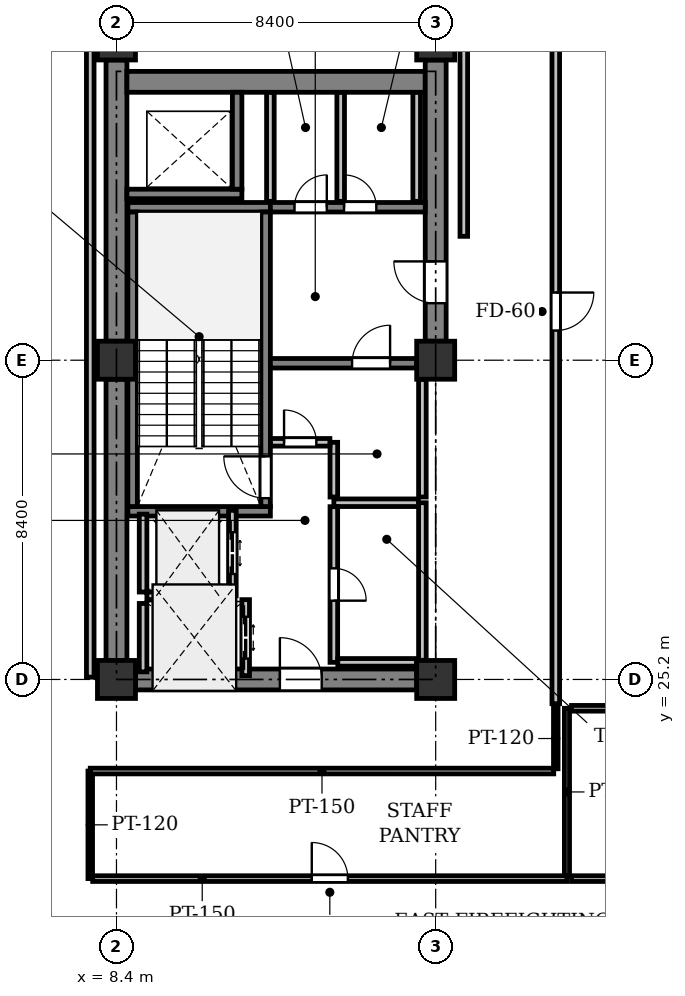
"""IFC4 building model, lengths in metres.
Left out: names, types, materials, properties, quantities, classifications, styles, units other than length and angle.
Written with IfcOpenShell. Run it as: python <this file> out.ifc"""

import sys

from ifc_helpers import new_model, si_unit, direction, frame, frame_2d, origin, origin_2d, place, context, subcontext, project, spatial, rectangle, extrude, element, fill, save


model = new_model("IFC4")
c1 = context("Model", 3, precision=1e-05, world=origin(), true_north=direction((0.0, 1.0)))
c2 = subcontext(c1, "Body", "Model", "MODEL_VIEW")
j1 = project(units=[si_unit("LENGTHUNIT", "METRE"), si_unit("PLANEANGLEUNIT", "RADIAN")], contexts=[c1])
p1 = place(None, origin())
s1 = spatial("IfcSite", under=j1, at=p1, CompositionType="ELEMENT")
p2 = place(p1, origin())
s2 = spatial("IfcBuilding", under=s1, at=p2, CompositionType="ELEMENT")
p3 = place(p2, frame((0.0, 0.0, 167.3)))
s3 = spatial("IfcBuildingStorey", under=s2, at=p3, CompositionType="ELEMENT", Elevation=167.3)
for number, where, z_axis, x_axis in (
    (1, (8.4, 25.2, 0.0), (0.0, 0.0, 1.0), (1.0, 0.0, 0.0)),
    (2, (8.4, 33.6, 0.0), (0.0, 0.0, 1.0), (1.0, 0.0, 0.0)),
    (3, (8.4, 42.0, 0.0), (0.0, 0.0, 1.0), (1.0, 0.0, 0.0)),
    (4, (16.8, 25.2, 0.0), (0.0, 0.0, 1.0), (1.0, 0.0, 0.0)),
    (5, (16.8, 33.6, 0.0), (0.0, 0.0, 1.0), (1.0, 0.0, 0.0)),
    (6, (16.8, 42.0, 0.0), (0.0, 0.0, 1.0), (1.0, 0.0, 0.0)),
):
    element("IfcColumn", number, at=place(p3, frame(where, z_axis=z_axis, x_axis=x_axis)), inside=s3, PredefinedType="COLUMN", context=c2, shape_type="SweptSolid", body=[
        extrude(rectangle(XDim=1.0, YDim=1.0, at=origin_2d()), origin(), (0.0, 0.0, 1.0), 4.1),
    ])
p4 = place(p3, frame((8.4, 25.7, 0.0), z_axis=(0.0, 0.0, 1.0), x_axis=(0.0, 1.0, 0.0)))
e7 = element("IfcWall", 7, at=p4, inside=s3, PredefinedType="SHEAR", context=c2, shape_type="SweptSolid", body=[
    extrude(rectangle(XDim=7.4, YDim=0.55, at=frame_2d((3.7, 0.0))), origin(), (0.0, 0.0, 1.0), 3.825),
])
p5 = place(p3, frame((8.4, 34.1, 0.0), z_axis=(0.0, 0.0, 1.0), x_axis=(0.0, 1.0, 0.0)))
e8 = element("IfcWall", 8, at=p5, inside=s3, PredefinedType="SHEAR", context=c2, shape_type="SweptSolid", body=[
    extrude(rectangle(XDim=7.4, YDim=0.55, at=frame_2d((3.7, 0.0))), origin(), (0.0, 0.0, 1.0), 3.825),
])
p6 = place(p3, frame((8.675, 40.925, 0.0), z_axis=(0.0, 0.0, 1.0), x_axis=(1.0, 0.0, 0.0)))
e9 = element("IfcWall", 9, at=p6, inside=s3, PredefinedType="SHEAR", context=c2, shape_type="SweptSolid", body=[
    extrude(rectangle(XDim=7.85, YDim=0.55, at=frame_2d((3.925, 0.0))), origin(), (0.0, 0.0, 1.0), 3.825),
])
p7 = place(p3, frame((16.8, 34.1, 0.0), z_axis=(0.0, 0.0, 1.0), x_axis=(0.0, 1.0, 0.0)))
e10 = element("IfcWall", 10, at=p7, inside=s3, PredefinedType="SHEAR", context=c2, shape_type="SweptSolid", body=[
    extrude(rectangle(XDim=7.4, YDim=0.55, at=frame_2d((3.7, 0.0))), origin(), (0.0, 0.0, 1.0), 3.825),
])
p8 = place(p7, frame((1.0, 0.0, 0.0)))
e11 = element("IfcOpeningElement", 11, at=p8, cuts=e10, PredefinedType="OPENING", context=c2, shape_type="SweptSolid", body=[
    extrude(rectangle(XDim=1.1, YDim=2.15, at=frame_2d((0.55, 1.075))), frame((0.0, 0.285, 0.0), z_axis=(0.0, -1.0, 0.0), x_axis=(1.0, 0.0, 0.0)), (0.0, 0.0, 1.0), 0.57),
])
p9 = place(p3, frame((8.9, 25.2, 0.0), z_axis=(0.0, 0.0, 1.0), x_axis=(1.0, 0.0, 0.0)))
e12 = element("IfcWall", 12, at=p9, inside=s3, PredefinedType="SHEAR", context=c2, shape_type="SweptSolid", body=[
    extrude(rectangle(XDim=7.4, YDim=0.55, at=frame_2d((3.7, 0.0))), origin(), (0.0, 0.0, 1.0), 3.825),
])
p10 = place(p9, frame((3.8, 0.0, 0.0)))
e13 = element("IfcOpeningElement", 13, at=p10, cuts=e12, PredefinedType="OPENING", context=c2, shape_type="SweptSolid", body=[
    extrude(rectangle(XDim=1.1, YDim=2.15, at=frame_2d((0.55, 1.075))), frame((0.0, 0.285, 0.0), z_axis=(0.0, -1.0, 0.0), x_axis=(1.0, 0.0, 0.0)), (0.0, 0.0, 1.0), 0.57),
])
for number, where, z_axis, x_axis in (
    (14, (12.45, 29.625, 0.0), (0.0, 0.0, 1.0), (-1.0, 0.0, 0.0)),
    (15, (12.45, 37.625, 0.0), (0.0, 0.0, 1.0), (-1.0, 0.0, 0.0)),
):
    element("IfcWall", number, at=place(p3, frame(where, z_axis=z_axis, x_axis=x_axis)), inside=s3, PredefinedType="SHEAR", context=c2, shape_type="SweptSolid", body=[
        extrude(rectangle(XDim=3.75, YDim=0.25, at=frame_2d((1.875, 0.0))), origin(), (0.0, 0.0, 1.0), 3.825),
    ])
p11 = place(p3, frame((12.325, 29.75, 0.0), z_axis=(0.0, 0.0, 1.0), x_axis=(0.0, 1.0, 0.0)))
e16 = element("IfcWall", 16, at=p11, inside=s3, PredefinedType="SHEAR", context=c2, shape_type="SweptSolid", body=[
    extrude(rectangle(XDim=7.75, YDim=0.25, at=frame_2d((3.875, 0.0))), origin(), (0.0, 0.0, 1.0), 3.825),
])
p12 = place(p11, frame((0.22, 0.0, 0.0)))
e17 = element("IfcOpeningElement", 17, at=p12, cuts=e16, PredefinedType="OPENING", context=c2, shape_type="SweptSolid", body=[
    extrude(rectangle(XDim=1.1, YDim=2.15, at=frame_2d((0.55, 1.075))), frame((0.0, 0.135, 0.0), z_axis=(0.0, -1.0, 0.0), x_axis=(1.0, 0.0, 0.0)), (0.0, 0.0, 1.0), 0.27),
])
p13 = place(p3, frame((8.825, 29.75, 0.0), z_axis=(0.0, 0.0, 1.0), x_axis=(0.0, 1.0, 0.0)))
e18 = element("IfcWall", 18, at=p13, inside=s3, PredefinedType="SHEAR", context=c2, shape_type="SweptSolid", body=[
    extrude(rectangle(XDim=7.75, YDim=0.25, at=frame_2d((3.875, 0.0))), origin(), (0.0, 0.0, 1.0), 3.825),
])
p14 = place(p3, frame((8.675, 37.975, 0.0), z_axis=(0.0, 0.0, 1.0), x_axis=(1.0, 0.0, 0.0)))
e19 = element("IfcWall", 19, at=p14, inside=s3, PredefinedType="SHEAR", context=c2, shape_type="SweptSolid", body=[
    extrude(rectangle(XDim=3.025, YDim=0.25, at=frame_2d((1.512, 0.0))), origin(), (0.0, 0.0, 1.0), 3.825),
])
p15 = place(p3, frame((11.575, 38.1, 0.0), z_axis=(0.0, 0.0, 1.0), x_axis=(0.0, 1.0, 0.0)))
e20 = element("IfcWall", 20, at=p15, inside=s3, PredefinedType="SHEAR", context=c2, shape_type="SweptSolid", body=[
    extrude(rectangle(XDim=2.55, YDim=0.25, at=frame_2d((1.275, 0.0))), origin(), (0.0, 0.0, 1.0), 3.825),
])
p16 = place(p3, frame((12.45, 33.52, 0.0), z_axis=(0.0, 0.0, 1.0), x_axis=(1.0, 0.0, 0.0)))
e21 = element("IfcWall", 21, at=p16, inside=s3, PredefinedType="SHEAR", context=c2, shape_type="SweptSolid", body=[
    extrude(rectangle(XDim=3.85, YDim=0.25, at=frame_2d((1.925, 0.0))), origin(), (0.0, 0.0, 1.0), 3.825),
])
p17 = place(p16, frame((2.15, 0.0, 0.0)))
e22 = element("IfcOpeningElement", 22, at=p17, cuts=e21, PredefinedType="OPENING", context=c2, shape_type="SweptSolid", body=[
    extrude(rectangle(XDim=1.0, YDim=2.15, at=frame_2d((0.5, 1.075))), frame((0.0, 0.135, 0.0), z_axis=(0.0, -1.0, 0.0), x_axis=(1.0, 0.0, 0.0)), (0.0, 0.0, 1.0), 0.27),
])
p18 = place(p3, frame((12.45, 37.625, 0.0), z_axis=(0.0, 0.0, 1.0), x_axis=(1.0, 0.0, 0.0)))
e23 = element("IfcWall", 23, at=p18, inside=s3, PredefinedType="SHEAR", context=c2, shape_type="SweptSolid", body=[
    extrude(rectangle(XDim=4.075, YDim=0.25, at=frame_2d((2.038, 0.0))), origin(), (0.0, 0.0, 1.0), 3.825),
])
p19 = place(p18, frame((0.635, 0.0, 0.0)))
e24 = element("IfcOpeningElement", 24, at=p19, cuts=e23, PredefinedType="OPENING", context=c2, shape_type="SweptSolid", body=[
    extrude(rectangle(XDim=0.85, YDim=2.15, at=frame_2d((0.425, 1.075))), frame((0.0, 0.135, 0.0), z_axis=(0.0, -1.0, 0.0), x_axis=(1.0, 0.0, 0.0)), (0.0, 0.0, 1.0), 0.27),
])
p20 = place(p18, frame((1.938, 0.0, 0.0)))
e25 = element("IfcOpeningElement", 25, at=p20, cuts=e23, PredefinedType="OPENING", context=c2, shape_type="SweptSolid", body=[
    extrude(rectangle(XDim=0.85, YDim=2.15, at=frame_2d((0.425, 1.075))), frame((0.0, 0.135, 0.0), z_axis=(0.0, -1.0, 0.0), x_axis=(1.0, 0.0, 0.0)), (0.0, 0.0, 1.0), 0.27),
])
p21 = place(p3, frame((11.45, 27.4, 0.0), z_axis=(0.0, 0.0, 1.0), x_axis=(0.0, 1.0, 0.0)))
e26 = element("IfcWall", 26, at=p21, inside=s3, PredefinedType="PARTITIONING", context=c2, shape_type="SweptSolid", body=[
    extrude(rectangle(XDim=2.25, YDim=0.2, at=frame_2d((1.125, 0.0))), origin(), (0.0, 0.0, 1.0), 3.825),
])
p22 = place(p21, frame((0.575, 0.0, 0.0)))
e27 = element("IfcOpeningElement", 27, at=p22, cuts=e26, PredefinedType="OPENING", context=c2, shape_type="SweptSolid", body=[
    extrude(rectangle(XDim=1.1, YDim=2.2, at=frame_2d((0.55, 1.1))), frame((0.0, 0.11, 0.0), z_axis=(0.0, -1.0, 0.0), x_axis=(1.0, 0.0, 0.0)), (0.0, 0.0, 1.0), 0.22),
])
p23 = place(p3, frame((9.1, 27.5, 0.0), z_axis=(0.0, 0.0, 1.0), x_axis=(0.0, 1.0, 0.0)))
e28 = element("IfcWall", 28, at=p23, inside=s3, PredefinedType="PARTITIONING", context=c2, shape_type="SweptSolid", body=[
    extrude(rectangle(XDim=2.05, YDim=0.2, at=frame_2d((1.025, 0.0))), origin(), (0.0, 0.0, 1.0), 3.825),
])
p24 = place(p3, frame((9.2, 27.4, 0.0), z_axis=(0.0, 0.0, 1.0), x_axis=(1.0, 0.0, 0.0)))
e29 = element("IfcWall", 29, at=p24, inside=s3, PredefinedType="PARTITIONING", context=c2, shape_type="SweptSolid", body=[
    extrude(rectangle(XDim=2.15, YDim=0.2, at=frame_2d((1.075, 0.0))), origin(), (0.0, 0.0, 1.0), 3.825),
])
p25 = place(p3, frame((11.8, 25.3, 0.0), z_axis=(0.0, 0.0, 1.0), x_axis=(0.0, 1.0, 0.0)))
e30 = element("IfcWall", 30, at=p25, inside=s3, PredefinedType="PARTITIONING", context=c2, shape_type="SweptSolid", body=[
    extrude(rectangle(XDim=2.0, YDim=0.2, at=frame_2d((1.0, 0.0))), origin(), (0.0, 0.0, 1.0), 2.425),
])
p26 = place(p25, frame((0.45, 0.0, 0.0)))
e31 = element("IfcOpeningElement", 31, at=p26, cuts=e30, PredefinedType="OPENING", context=c2, shape_type="SweptSolid", body=[
    extrude(rectangle(XDim=1.1, YDim=2.2, at=frame_2d((0.55, 1.1))), frame((0.0, 0.11, 0.0), z_axis=(0.0, -1.0, 0.0), x_axis=(1.0, 0.0, 0.0)), (0.0, 0.0, 1.0), 0.22),
])
p27 = place(p3, frame((9.1, 25.4, 0.0), z_axis=(0.0, 0.0, 1.0), x_axis=(0.0, 1.0, 0.0)))
e32 = element("IfcWall", 32, at=p27, inside=s3, PredefinedType="PARTITIONING", context=c2, shape_type="SweptSolid", body=[
    extrude(rectangle(XDim=1.8, YDim=0.2, at=frame_2d((0.9, 0.0))), origin(), (0.0, 0.0, 1.0), 2.425),
])
p28 = place(p3, frame((16.45, 25.705, 0.0), z_axis=(0.0, 0.0, 1.0), x_axis=(0.0, 1.0, 0.0)))
e33 = element("IfcWall", 33, at=p28, inside=s3, PredefinedType="PARTITIONING", context=c2, shape_type="SweptSolid", body=[
    extrude(rectangle(XDim=4.145, YDim=0.2, at=frame_2d((2.073, 0.0))), origin(), (0.0, 0.0, 1.0), 3.825),
])
p29 = place(p3, frame((16.346, 29.85, 0.0), z_axis=(0.0, 0.0, 1.0), x_axis=(-1.0, 0.0, 0.0)))
e34 = element("IfcWall", 34, at=p29, inside=s3, PredefinedType="PARTITIONING", context=c2, shape_type="SweptSolid", body=[
    extrude(rectangle(XDim=2.226, YDim=0.2, at=frame_2d((1.113, 0.0))), origin(), (0.0, 0.0, 1.0), 3.825),
])
p30 = place(p3, frame((14.12, 29.746, 0.0), z_axis=(0.0, 0.0, 1.0), x_axis=(0.0, -1.0, 0.0)))
e35 = element("IfcWall", 35, at=p30, inside=s3, PredefinedType="PARTITIONING", context=c2, shape_type="SweptSolid", body=[
    extrude(rectangle(XDim=4.096, YDim=0.2, at=frame_2d((2.048, 0.0))), origin(), (0.0, 0.0, 1.0), 3.825),
])
p31 = place(p30, frame((1.623, 0.0, 0.0)))
e36 = element("IfcOpeningElement", 36, at=p31, cuts=e35, PredefinedType="OPENING", context=c2, shape_type="SweptSolid", body=[
    extrude(rectangle(XDim=0.85, YDim=2.15, at=frame_2d((0.425, 1.075))), frame((0.0, 0.11, 0.0), z_axis=(0.0, -1.0, 0.0), x_axis=(1.0, 0.0, 0.0)), (0.0, 0.0, 1.0), 0.22),
])
p32 = place(p3, frame((14.224, 25.65, 0.0), z_axis=(0.0, 0.0, 1.0), x_axis=(1.0, 0.0, 0.0)))
e37 = element("IfcWall", 37, at=p32, inside=s3, PredefinedType="PARTITIONING", context=c2, shape_type="SweptSolid", body=[
    extrude(rectangle(XDim=2.071, YDim=0.2, at=frame_2d((1.035, 0.0))), origin(), (0.0, 0.0, 1.0), 3.825),
])
p33 = place(p3, frame((14.12, 31.44, 0.0), z_axis=(0.0, 0.0, 1.0), x_axis=(0.0, -1.0, 0.0)))
e38 = element("IfcWall", 38, at=p33, inside=s3, PredefinedType="PARTITIONING", context=c2, shape_type="SweptSolid", body=[
    extrude(rectangle(XDim=1.44, YDim=0.2, at=frame_2d((0.72, 0.0))), origin(), (0.0, 0.0, 1.0), 3.825),
])
p34 = place(p3, frame((16.45, 30.0, 0.0), z_axis=(0.0, 0.0, 1.0), x_axis=(0.0, 1.0, 0.0)))
e39 = element("IfcWall", 39, at=p34, inside=s3, PredefinedType="PARTITIONING", context=c2, shape_type="SweptSolid", body=[
    extrude(rectangle(XDim=3.095, YDim=0.2, at=frame_2d((1.547, 0.0))), origin(), (0.0, 0.0, 1.0), 3.825),
])
p35 = place(p3, frame((12.454, 31.44, 0.0), z_axis=(0.0, 0.0, 1.0), x_axis=(1.0, 0.0, 0.0)))
e40 = element("IfcWall", 40, at=p35, inside=s3, PredefinedType="PARTITIONING", context=c2, shape_type="SweptSolid", body=[
    extrude(rectangle(XDim=1.562, YDim=0.2, at=frame_2d((0.781, 0.0))), origin(), (0.0, 0.0, 1.0), 3.825),
])
p36 = place(p35, frame((0.356, 0.0, 0.0)))
e41 = element("IfcOpeningElement", 41, at=p36, cuts=e40, PredefinedType="OPENING", context=c2, shape_type="SweptSolid", body=[
    extrude(rectangle(XDim=0.85, YDim=2.15, at=frame_2d((0.425, 1.075))), frame((0.0, 0.11, 0.0), z_axis=(0.0, -1.0, 0.0), x_axis=(1.0, 0.0, 0.0)), (0.0, 0.0, 1.0), 0.22),
])
for number, where, z_axis, x_axis in (
    (42, (14.3, 37.78, 0.0), (0.0, 0.0, 1.0), (0.0, 1.0, 0.0)),
    (43, (12.45, 40.646, 0.0), (0.0, 0.0, 1.0), (0.0, -1.0, 0.0)),
    (44, (16.3, 37.78, 0.0), (0.0, 0.0, 1.0), (0.0, 1.0, 0.0)),
):
    element("IfcWall", number, at=place(p3, frame(where, z_axis=z_axis, x_axis=x_axis)), inside=s3, PredefinedType="PARTITIONING", context=c2, shape_type="SweptSolid", body=[
        extrude(rectangle(XDim=2.866, YDim=0.2, at=frame_2d((1.433, 0.0))), origin(), (0.0, 0.0, 1.0), 2.875),
    ])
p37 = place(p3, frame((7.71, 22.79, 0.0), z_axis=(0.0, 0.0, 1.0), x_axis=(0.0, -1.0, 0.0)))
e45 = element("IfcWall", 45, at=p37, inside=s3, PredefinedType="PARTITIONING", context=c2, shape_type="SweptSolid", body=[
    extrude(rectangle(XDim=2.83, YDim=0.12, at=frame_2d((1.415, 0.0))), origin(), (0.0, 0.0, 1.0), 3.825),
])
p38 = place(p3, frame((7.774, 19.96, 0.0), z_axis=(0.0, 0.0, 1.0), x_axis=(1.0, 0.0, 0.0)))
e46 = element("IfcWall", 46, at=p38, inside=s3, PredefinedType="PARTITIONING", context=c2, shape_type="SweptSolid", body=[
    extrude(rectangle(XDim=12.48, YDim=0.15, at=frame_2d((6.24, 0.0))), origin(), (0.0, 0.0, 1.0), 3.371),
])
p39 = place(p38, frame((5.765, 0.0, 0.0)))
e47 = element("IfcOpeningElement", 47, at=p39, cuts=e46, PredefinedType="OPENING", context=c2, shape_type="SweptSolid", body=[
    extrude(rectangle(XDim=0.95, YDim=2.15, at=frame_2d((0.475, 1.075))), frame((0.0, 0.085, 0.0), z_axis=(0.0, -1.0, 0.0), x_axis=(1.0, 0.0, 0.0)), (0.0, 0.0, 1.0), 0.17),
])
p40 = place(p3, frame((20.254, 20.039, 0.0), z_axis=(0.0, 0.0, 1.0), x_axis=(0.0, 1.0, 0.0)))
e48 = element("IfcWall", 48, at=p40, inside=s3, PredefinedType="PARTITIONING", context=c2, shape_type="SweptSolid", body=[
    extrude(rectangle(XDim=4.403, YDim=0.135, at=frame_2d((2.201, 0.0))), origin(), (0.0, 0.0, 1.0), 3.825),
])
p41 = place(p3, frame((19.96, 24.442, 0.0), z_axis=(0.0, 0.0, 1.0), x_axis=(0.0, -1.0, 0.0)))
e49 = element("IfcWall", 49, at=p41, inside=s3, PredefinedType="PARTITIONING", context=c2, shape_type="SweptSolid", body=[
    extrude(rectangle(XDim=1.592, YDim=0.12, at=frame_2d((0.796, 0.0))), origin(), (0.0, 0.0, 1.0), 3.825),
])
p42 = place(p3, frame((19.906, 22.79, 0.0), z_axis=(0.0, 0.0, 1.0), x_axis=(-0.9999999998, -2.0018016e-05, 0.0)))
e50 = element("IfcWall", 50, at=p42, inside=s3, PredefinedType="PARTITIONING", context=c2, shape_type="SweptSolid", body=[
    extrude(rectangle(XDim=12.196, YDim=0.15, at=frame_2d((6.098, 0.0))), origin(), (0.0, 0.0, 1.0), 3.371),
])
p43 = place(p3, frame((41.831, 24.442, 0.0), z_axis=(0.0, 0.0, 1.0), x_axis=(-1.0, 0.0, 0.0)))
e51 = element("IfcWall", 51, at=p43, inside=s3, PredefinedType="PARTITIONING", context=c2, shape_type="SweptSolid", body=[
    extrude(rectangle(XDim=21.457, YDim=0.15, at=frame_2d((10.728, 0.0))), origin(), (0.0, 0.0, 1.0), 3.371),
])
p44 = place(p3, frame((20.375, 19.96, 0.0), z_axis=(0.0, 0.0, 1.0), x_axis=(1.0, 0.0, 0.0)))
e52 = element("IfcWall", 52, at=p44, inside=s3, PredefinedType="PARTITIONING", context=c2, shape_type="SweptSolid", body=[
    extrude(rectangle(XDim=16.275, YDim=0.15, at=frame_2d((8.138, 0.0))), origin(), (0.0, 0.0, 1.0), 3.371),
])
p45 = place(p44, frame((7.663, 0.0, 0.0)))
e53 = element("IfcOpeningElement", 53, at=p45, cuts=e52, PredefinedType="OPENING", context=c2, shape_type="SweptSolid", body=[
    extrude(rectangle(XDim=0.95, YDim=2.15, at=frame_2d((0.475, 1.075))), frame((0.0, 0.085, 0.0), z_axis=(0.0, -1.0, 0.0), x_axis=(1.0, 0.0, 0.0)), (0.0, 0.0, 1.0), 0.17),
])
p46 = place(p3, frame((19.96, 45.2, 0.0), z_axis=(0.0, 0.0, 1.0), x_axis=(0.0, -1.0, 0.0)))
e54 = element("IfcWall", 54, at=p46, inside=s3, PredefinedType="PARTITIONING", context=c2, shape_type="SweptSolid", body=[
    extrude(rectangle(XDim=20.638, YDim=0.2, at=frame_2d((10.319, 0.0))), origin(), (0.0, 0.0, 1.0), 3.365),
])
p47 = place(p46, frame((9.819, 0.0, 0.0)))
e55 = element("IfcOpeningElement", 55, at=p47, cuts=e54, PredefinedType="OPENING", context=c2, shape_type="SweptSolid", body=[
    extrude(rectangle(XDim=1.0, YDim=2.15, at=frame_2d((0.5, 1.075))), frame((0.0, 0.11, 0.0), z_axis=(0.0, -1.0, 0.0), x_axis=(1.0, 0.0, 0.0)), (0.0, 0.0, 1.0), 0.22),
])
p48 = place(p3, frame((7.71, 45.206, 0.0), z_axis=(0.0, 0.0, 1.0), x_axis=(1.2240202e-05, -0.999999999925, 0.0)))
e56 = element("IfcWall", 56, at=p48, inside=s3, PredefinedType="PARTITIONING", context=c2, shape_type="SweptSolid", body=[
    extrude(rectangle(XDim=19.946, YDim=0.2, at=frame_2d((9.973, 0.0))), origin(), (0.0, 0.0, 1.0), 2.425),
])
p49 = place(p3, frame((17.54, 36.86, 0.0), z_axis=(0.0, 0.0, 1.0), x_axis=(0.0, 1.0, 0.0)))
e57 = element("IfcWall", 57, at=p49, inside=s3, PredefinedType="PARTITIONING", context=c2, shape_type="SweptSolid", body=[
    extrude(rectangle(XDim=8.34, YDim=0.2, at=frame_2d((4.17, 0.0))), origin(), (0.0, 0.0, 1.0), 3.365),
])
p50 = place(p8, origin())
e58 = element("IfcDoor", 58, at=p50, inside=s3, OperationType="SINGLE_SWING_RIGHT", PredefinedType="DOOR", context=c2, shape_type="SweptSolid", body=[
    extrude(rectangle(XDim=1.1, YDim=2.15, at=frame_2d((0.55, 1.075))), frame((0.0, 0.025, 0.0), z_axis=(0.0, -1.0, 0.0), x_axis=(1.0, 0.0, 0.0)), (0.0, 0.0, 1.0), 0.05),
])
fill(e11, e58)
p51 = place(p10, origin())
e59 = element("IfcDoor", 59, at=p51, inside=s3, OperationType="SINGLE_SWING_LEFT", PredefinedType="DOOR", context=c2, shape_type="SweptSolid", body=[
    extrude(rectangle(XDim=1.1, YDim=2.15, at=frame_2d((0.55, 1.075))), frame((0.0, 0.025, 0.0), z_axis=(0.0, -1.0, 0.0), x_axis=(1.0, 0.0, 0.0)), (0.0, 0.0, 1.0), 0.05),
])
fill(e13, e59)
p52 = place(p12, origin())
e60 = element("IfcDoor", 60, at=p52, inside=s3, OperationType="SINGLE_SWING_RIGHT", PredefinedType="DOOR", context=c2, shape_type="SweptSolid", body=[
    extrude(rectangle(XDim=1.1, YDim=2.15, at=frame_2d((0.55, 1.075))), frame((0.0, 0.025, 0.0), z_axis=(0.0, -1.0, 0.0), x_axis=(1.0, 0.0, 0.0)), (0.0, 0.0, 1.0), 0.05),
])
fill(e17, e60)
p53 = place(p17, origin())
e61 = element("IfcDoor", 61, at=p53, inside=s3, OperationType="SINGLE_SWING_RIGHT", PredefinedType="DOOR", context=c2, shape_type="SweptSolid", body=[
    extrude(rectangle(XDim=1.0, YDim=2.15, at=frame_2d((0.5, 1.075))), frame((0.0, 0.025, 0.0), z_axis=(0.0, -1.0, 0.0), x_axis=(1.0, 0.0, 0.0)), (0.0, 0.0, 1.0), 0.05),
])
fill(e22, e61)
p54 = place(p22, origin())
e62 = element("IfcDoor", 62, at=p54, inside=s3, OperationType="DOUBLE_DOOR_SLIDING", PredefinedType="DOOR", context=c2, shape_type="SweptSolid", body=[
    extrude(rectangle(XDim=1.1, YDim=2.2, at=frame_2d((0.55, 1.1))), frame((0.0, 0.025, 0.0), z_axis=(0.0, -1.0, 0.0), x_axis=(1.0, 0.0, 0.0)), (0.0, 0.0, 1.0), 0.05),
])
fill(e27, e62)
p55 = place(p26, origin())
e63 = element("IfcDoor", 63, at=p55, inside=s3, OperationType="DOUBLE_DOOR_SLIDING", PredefinedType="DOOR", context=c2, shape_type="SweptSolid", body=[
    extrude(rectangle(XDim=1.1, YDim=2.2, at=frame_2d((0.55, 1.1))), frame((0.0, 0.025, 0.0), z_axis=(0.0, -1.0, 0.0), x_axis=(1.0, 0.0, 0.0)), (0.0, 0.0, 1.0), 0.05),
])
fill(e31, e63)
p56 = place(p31, origin())
e64 = element("IfcDoor", 64, at=p56, inside=s3, OperationType="SINGLE_SWING_RIGHT", PredefinedType="DOOR", context=c2, shape_type="SweptSolid", body=[
    extrude(rectangle(XDim=0.85, YDim=2.15, at=frame_2d((0.425, 1.075))), frame((0.0, 0.025, 0.0), z_axis=(0.0, -1.0, 0.0), x_axis=(1.0, 0.0, 0.0)), (0.0, 0.0, 1.0), 0.05),
])
fill(e36, e64)
p57 = place(p36, origin())
e65 = element("IfcDoor", 65, at=p57, inside=s3, OperationType="SINGLE_SWING_LEFT", PredefinedType="DOOR", context=c2, shape_type="SweptSolid", body=[
    extrude(rectangle(XDim=0.85, YDim=2.15, at=frame_2d((0.425, 1.075))), frame((0.0, 0.025, 0.0), z_axis=(0.0, -1.0, 0.0), x_axis=(1.0, 0.0, 0.0)), (0.0, 0.0, 1.0), 0.05),
])
fill(e41, e65)
p58 = place(p19, origin())
e66 = element("IfcDoor", 66, at=p58, inside=s3, OperationType="SINGLE_SWING_RIGHT", PredefinedType="DOOR", context=c2, shape_type="SweptSolid", body=[
    extrude(rectangle(XDim=0.85, YDim=2.15, at=frame_2d((0.425, 1.075))), frame((0.0, 0.025, 0.0), z_axis=(0.0, -1.0, 0.0), x_axis=(1.0, 0.0, 0.0)), (0.0, 0.0, 1.0), 0.05),
])
fill(e24, e66)
p59 = place(p20, origin())
e67 = element("IfcDoor", 67, at=p59, inside=s3, OperationType="SINGLE_SWING_LEFT", PredefinedType="DOOR", context=c2, shape_type="SweptSolid", body=[
    extrude(rectangle(XDim=0.85, YDim=2.15, at=frame_2d((0.425, 1.075))), frame((0.0, 0.025, 0.0), z_axis=(0.0, -1.0, 0.0), x_axis=(1.0, 0.0, 0.0)), (0.0, 0.0, 1.0), 0.05),
])
fill(e25, e67)
p60 = place(p39, origin())
e68 = element("IfcDoor", 68, at=p60, inside=s3, OperationType="SINGLE_SWING_LEFT", PredefinedType="DOOR", context=c2, shape_type="SweptSolid", body=[
    extrude(rectangle(XDim=0.95, YDim=2.15, at=frame_2d((0.475, 1.075))), frame((0.0, 0.025, 0.0), z_axis=(0.0, -1.0, 0.0), x_axis=(1.0, 0.0, 0.0)), (0.0, 0.0, 1.0), 0.05),
])
fill(e47, e68)
p61 = place(p47, origin())
e69 = element("IfcDoor", 69, at=p61, inside=s3, OperationType="SINGLE_SWING_LEFT", PredefinedType="DOOR", context=c2, shape_type="SweptSolid", body=[
    extrude(rectangle(XDim=1.0, YDim=2.15, at=frame_2d((0.5, 1.075))), frame((0.0, 0.025, 0.0), z_axis=(0.0, -1.0, 0.0), x_axis=(1.0, 0.0, 0.0)), (0.0, 0.0, 1.0), 0.05),
])
fill(e55, e69)
save(model, sys.argv[1])
